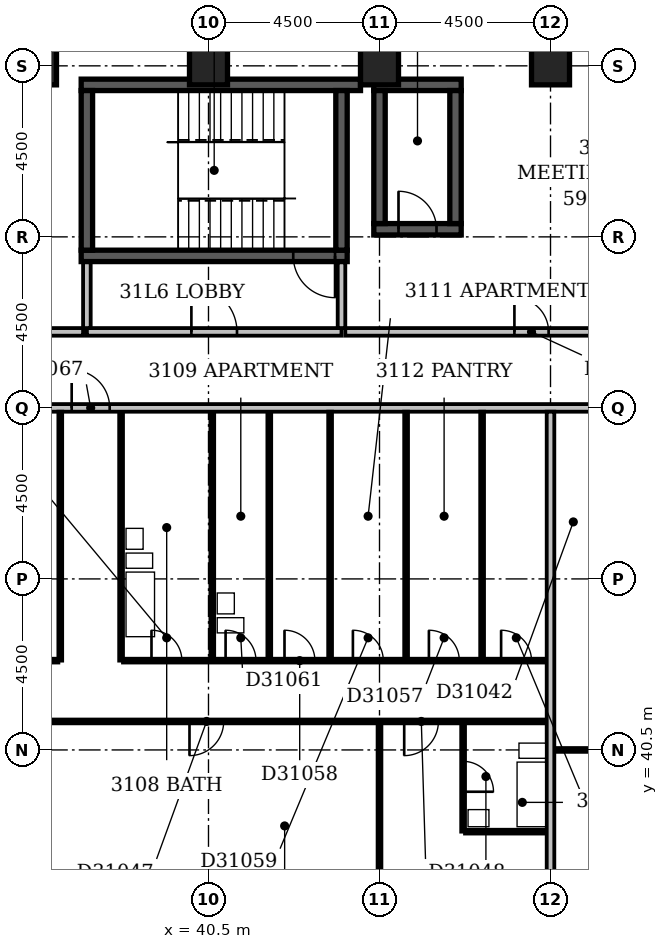
"""IFC4 building model, lengths in metres.
Left out: names, types, materials, properties, quantities, classifications, styles, units other than length and angle.
Written with IfcOpenShell. Run it as: python <this file> out.ifc"""

import sys

from ifc_helpers import new_model, si_unit, direction, frame, frame_2d, origin, origin_2d, place, context, subcontext, project, spatial, rectangle, extrude, element, fill, save


model = new_model("IFC4")
c1 = context("Model", 3, precision=1e-05, world=origin(), true_north=direction((0.0, 1.0)))
c2 = subcontext(c1, "Body", "Model", "MODEL_VIEW")
j1 = project(units=[si_unit("LENGTHUNIT", "METRE"), si_unit("PLANEANGLEUNIT", "RADIAN")], contexts=[c1])
p1 = place(None, origin())
s1 = spatial("IfcSite", under=j1, at=p1, CompositionType="ELEMENT")
p2 = place(p1, origin())
s2 = spatial("IfcBuilding", under=s1, at=p2, CompositionType="ELEMENT")
p3 = place(p2, frame((0.0, 0.0, 126.8)))
s3 = spatial("IfcBuildingStorey", under=s2, at=p3, CompositionType="ELEMENT", Elevation=126.8)
p4 = place(p3, frame((37.15, 53.5, -0.3), z_axis=(0.0, 0.0, 1.0), x_axis=(1.0, 0.0, 0.0)))
e1 = element("IfcWall", 1, at=p4, inside=s3, PredefinedType="SHEAR", context=c2, shape_type="SweptSolid", body=[
    extrude(rectangle(XDim=7.0, YDim=0.3, at=frame_2d((3.5, 0.0))), origin(), (0.0, 0.0, 1.0), 3.6),
])
p5 = place(p4, frame((5.58, 0.0, 0.3)))
e2 = element("IfcOpeningElement", 2, at=p5, cuts=e1, PredefinedType="OPENING", context=c2, shape_type="SweptSolid", body=[
    extrude(rectangle(XDim=1.1, YDim=2.1, at=frame_2d((0.55, 1.05))), frame((0.0, 0.162, 0.0), z_axis=(0.0, -1.0, 0.0), x_axis=(1.0, 0.0, 0.0)), (0.0, 0.0, 1.0), 0.324),
])
p6 = place(p3, frame((37.15, 58.0, -0.3), z_axis=(0.0, 0.0, 1.0), x_axis=(1.0, 0.0, 0.0)))
e3 = element("IfcWall", 3, at=p6, inside=s3, PredefinedType="SHEAR", context=c2, shape_type="SweptSolid", body=[
    extrude(rectangle(XDim=7.35, YDim=0.3, at=frame_2d((3.675, 0.0))), origin(), (0.0, 0.0, 1.0), 3.6),
])
for number, where, z_axis, x_axis in (
    (4, (37.3, 53.65, -0.3), (0.0, 0.0, 1.0), (0.0, 1.0, 0.0)),
    (5, (44.0, 53.65, -0.3), (0.0, 0.0, 1.0), (0.0, 1.0, 0.0)),
):
    element("IfcWall", number, at=place(p3, frame(where, z_axis=z_axis, x_axis=x_axis)), inside=s3, PredefinedType="SHEAR", context=c2, shape_type="SweptSolid", body=[
        extrude(rectangle(XDim=4.2, YDim=0.3, at=frame_2d((2.1, 0.0))), origin(), (0.0, 0.0, 1.0), 3.6),
    ])
p7 = place(p3, frame((44.85, 54.2, -0.3), z_axis=(0.0, 0.0, 1.0), x_axis=(1.0, 0.0, 0.0)))
e6 = element("IfcWall", 6, at=p7, inside=s3, PredefinedType="SHEAR", context=c2, shape_type="SweptSolid", body=[
    extrude(rectangle(XDim=2.3, YDim=0.3, at=frame_2d((1.15, 0.0))), origin(), (0.0, 0.0, 1.0), 3.6),
])
p8 = place(p7, frame((0.65, 0.0, 0.3)))
e7 = element("IfcOpeningElement", 7, at=p8, cuts=e6, PredefinedType="OPENING", context=c2, shape_type="SweptSolid", body=[
    extrude(rectangle(XDim=1.0, YDim=2.1, at=frame_2d((0.5, 1.05))), frame((0.0, 0.162, 0.0), z_axis=(0.0, -1.0, 0.0), x_axis=(1.0, 0.0, 0.0)), (0.0, 0.0, 1.0), 0.324),
])
p9 = place(p3, frame((44.85, 58.0, -0.3), z_axis=(0.0, 0.0, 1.0), x_axis=(1.0, 0.0, 0.0)))
e8 = element("IfcWall", 8, at=p9, inside=s3, PredefinedType="SHEAR", context=c2, shape_type="SweptSolid", body=[
    extrude(rectangle(XDim=2.3, YDim=0.3, at=frame_2d((1.15, 0.0))), origin(), (0.0, 0.0, 1.0), 3.6),
])
for number, where, z_axis, x_axis in (
    (9, (45.0, 54.35, -0.3), (0.0, 0.0, 1.0), (0.0, 1.0, 0.0)),
    (10, (47.0, 54.35, -0.3), (0.0, 0.0, 1.0), (0.0, 1.0, 0.0)),
):
    element("IfcWall", number, at=place(p3, frame(where, z_axis=z_axis, x_axis=x_axis)), inside=s3, PredefinedType="SHEAR", context=c2, shape_type="SweptSolid", body=[
        extrude(rectangle(XDim=3.5, YDim=0.3, at=frame_2d((1.75, 0.0))), origin(), (0.0, 0.0, 1.0), 3.6),
    ])
for number, where, z_axis, x_axis in (
    (11, (36.0, 58.5, -0.3), (0.0, 0.0, 1.0), (1.0, 0.0, 0.0)),
    (12, (40.5, 58.5, -0.3), (0.0, 0.0, 1.0), (1.0, 0.0, 0.0)),
    (13, (45.0, 58.5, -0.3), (0.0, 0.0, 1.0), (1.0, 0.0, 0.0)),
    (14, (49.5, 58.5, -0.3), (0.0, 0.0, 1.0), (1.0, 0.0, 0.0)),
):
    element("IfcColumn", number, at=place(p3, frame(where, z_axis=z_axis, x_axis=x_axis)), inside=s3, PredefinedType="COLUMN", context=c2, shape_type="SweptSolid", body=[
        extrude(rectangle(XDim=1.0, YDim=1.0, at=origin_2d()), origin(), (0.0, 0.0, 1.0), 3.6),
    ])
p10 = place(p3, frame((37.3, 51.5, 0.0), z_axis=(0.0, 0.0, 1.0), x_axis=(1.0, 0.0, 0.0)))
e15 = element("IfcWall", 15, at=p10, inside=s3, PredefinedType="PARTITIONING", context=c2, shape_type="SweptSolid", body=[
    extrude(rectangle(XDim=6.7, YDim=0.2, at=frame_2d((3.35, 0.0))), origin(), (0.0, 0.0, 1.0), 3.3),
])
p11 = place(p10, frame((2.75, 0.0, 0.0)))
e16 = element("IfcOpeningElement", 16, at=p11, cuts=e15, PredefinedType="OPENING", context=c2, shape_type="SweptSolid", body=[
    extrude(rectangle(XDim=1.2, YDim=2.1, at=frame_2d((0.6, 1.05))), frame((0.0, 0.112, 0.0), z_axis=(0.0, -1.0, 0.0), x_axis=(1.0, 0.0, 0.0)), (0.0, 0.0, 1.0), 0.224),
])
for number, where, z_axis, x_axis in (
    (17, (44.0, 51.6, 0.0), (0.0, 0.0, 1.0), (0.0, 1.0, 0.0)),
    (18, (37.3, 51.6, 0.0), (0.0, 0.0, 1.0), (0.0, 1.0, 0.0)),
):
    element("IfcWall", number, at=place(p3, frame(where, z_axis=z_axis, x_axis=x_axis)), inside=s3, PredefinedType="PARTITIONING", context=c2, shape_type="SweptSolid", body=[
        extrude(rectangle(XDim=1.73, YDim=0.2, at=frame_2d((0.865, 0.0))), origin(), (0.0, 0.0, 1.0), 3.3),
    ])
p12 = place(p3, frame((45.0, 36.5, 0.0), z_axis=(0.0, 0.0, 1.0), x_axis=(0.0, 1.0, 0.0)))
e19 = element("IfcWall", 19, at=p12, inside=s3, PredefinedType="PARTITIONING", context=c2, shape_type="SweptSolid", body=[
    extrude(rectangle(XDim=4.7, YDim=0.1, at=frame_2d((2.35, 0.0))), origin(), (0.0, 0.0, 1.0), 2.6),
])
p13 = place(p3, frame((49.5, 36.5, 0.0), z_axis=(0.0, 0.0, 1.0), x_axis=(0.0, 1.0, 0.0)))
e20 = element("IfcWall", 20, at=p13, inside=s3, PredefinedType="PARTITIONING", context=c2, shape_type="SweptSolid", body=[
    extrude(rectangle(XDim=12.9, YDim=0.2, at=frame_2d((6.45, 0.0))), origin(), (0.0, 0.0, 1.0), 3.3),
])
p14 = place(p3, frame((47.2, 38.35, 0.0), z_axis=(0.0, 0.0, 1.0), x_axis=(0.0, 1.0, 0.0)))
e21 = element("IfcWall", 21, at=p14, inside=s3, PredefinedType="PLUMBINGWALL", context=c2, shape_type="SweptSolid", body=[
    extrude(rectangle(XDim=2.85, YDim=0.1, at=frame_2d((1.425, 0.0))), origin(), (0.0, 0.0, 1.0), 3.3),
])
p15 = place(p14, frame((1.05, 0.0, 0.0)))
e22 = element("IfcOpeningElement", 22, at=p15, cuts=e21, PredefinedType="OPENING", context=c2, shape_type="SweptSolid", body=[
    extrude(rectangle(XDim=0.8, YDim=2.1, at=frame_2d((0.4, 1.05))), frame((0.0, 0.062, 0.0), z_axis=(0.0, -1.0, 0.0), x_axis=(1.0, 0.0, 0.0)), (0.0, 0.0, 1.0), 0.124),
])
p16 = place(p3, frame((47.25, 38.35, 0.0), z_axis=(0.0, 0.0, 1.0), x_axis=(1.0, 0.0, 0.0)))
e23 = element("IfcWall", 23, at=p16, inside=s3, PredefinedType="PLUMBINGWALL", context=c2, shape_type="SweptSolid", body=[
    extrude(rectangle(XDim=2.15, YDim=0.1, at=frame_2d((1.075, 0.0))), origin(), (0.0, 0.0, 1.0), 3.3),
])
p17 = place(p3, frame((49.6, 40.5, 0.0), z_axis=(0.0, 0.0, 1.0), x_axis=(1.0, 0.0, 0.0)))
e24 = element("IfcWall", 24, at=p17, inside=s3, PredefinedType="PARTITIONING", context=c2, shape_type="SweptSolid", body=[
    extrude(rectangle(XDim=4.3, YDim=0.1, at=frame_2d((2.15, 0.0))), origin(), (0.0, 0.0, 1.0), 3.3),
])
p18 = place(p17, frame((1.7, 0.0, 0.0)))
e25 = element("IfcOpeningElement", 25, at=p18, cuts=e24, PredefinedType="OPENING", context=c2, shape_type="SweptSolid", body=[
    extrude(rectangle(XDim=0.9, YDim=2.1, at=frame_2d((0.45, 1.05))), frame((0.0, 0.062, 0.0), z_axis=(0.0, -1.0, 0.0), x_axis=(1.0, 0.0, 0.0)), (0.0, 0.0, 1.0), 0.124),
])
p19 = place(p3, frame((31.6, 41.25, 0.0), z_axis=(0.0, 0.0, 1.0), x_axis=(1.0, 0.0, 0.0)))
e26 = element("IfcWall", 26, at=p19, inside=s3, PredefinedType="PARTITIONING", context=c2, shape_type="SweptSolid", body=[
    extrude(rectangle(XDim=17.8, YDim=0.1, at=frame_2d((8.9, 0.0))), origin(), (0.0, 0.0, 1.0), 3.3),
])
p20 = place(p19, frame((2.85, 0.0, 0.0)))
e27 = element("IfcOpeningElement", 27, at=p20, cuts=e26, PredefinedType="OPENING", context=c2, shape_type="SweptSolid", body=[
    extrude(rectangle(XDim=0.9, YDim=2.1, at=frame_2d((0.45, 1.05))), frame((0.0, 0.062, 0.0), z_axis=(0.0, -1.0, 0.0), x_axis=(1.0, 0.0, 0.0)), (0.0, 0.0, 1.0), 0.124),
])
p21 = place(p19, frame((8.4, 0.0, 0.0)))
e28 = element("IfcOpeningElement", 28, at=p21, cuts=e26, PredefinedType="OPENING", context=c2, shape_type="SweptSolid", body=[
    extrude(rectangle(XDim=0.9, YDim=2.1, at=frame_2d((0.45, 1.05))), frame((0.0, 0.062, 0.0), z_axis=(0.0, -1.0, 0.0), x_axis=(1.0, 0.0, 0.0)), (0.0, 0.0, 1.0), 0.124),
])
p22 = place(p19, frame((14.05, 0.0, 0.0)))
e29 = element("IfcOpeningElement", 29, at=p22, cuts=e26, PredefinedType="OPENING", context=c2, shape_type="SweptSolid", body=[
    extrude(rectangle(XDim=0.9, YDim=2.1, at=frame_2d((0.45, 1.05))), frame((0.0, 0.062, 0.0), z_axis=(0.0, -1.0, 0.0), x_axis=(1.0, 0.0, 0.0)), (0.0, 0.0, 1.0), 0.124),
])
p23 = place(p3, frame((31.6, 42.85, 0.0), z_axis=(0.0, 0.0, 1.0), x_axis=(1.0, 0.0, 0.0)))
e30 = element("IfcWall", 30, at=p23, inside=s3, PredefinedType="PARTITIONING", context=c2, shape_type="SweptSolid", body=[
    extrude(rectangle(XDim=4.95, YDim=0.1, at=frame_2d((2.475, 0.0))), origin(), (0.0, 0.0, 1.0), 3.3),
])
p24 = place(p23, frame((2.0, 0.0, 0.0)))
e31 = element("IfcOpeningElement", 31, at=p24, cuts=e30, PredefinedType="OPENING", context=c2, shape_type="SweptSolid", body=[
    extrude(rectangle(XDim=0.9, YDim=2.1, at=frame_2d((0.45, 1.05))), frame((0.0, 0.062, 0.0), z_axis=(0.0, -1.0, 0.0), x_axis=(1.0, 0.0, 0.0)), (0.0, 0.0, 1.0), 0.124),
])
p25 = place(p3, frame((36.6, 42.85, 0.0), z_axis=(0.0, 0.0, 1.0), x_axis=(0.0, 1.0, 0.0)))
e32 = element("IfcWall", 32, at=p25, inside=s3, PredefinedType="PARTITIONING", context=c2, shape_type="SweptSolid", body=[
    extrude(rectangle(XDim=6.55, YDim=0.1, at=frame_2d((3.275, 0.0))), origin(), (0.0, 0.0, 1.0), 2.4),
])
p26 = place(p3, frame((38.2, 42.85, 0.0), z_axis=(0.0, 0.0, 1.0), x_axis=(0.0, 1.0, 0.0)))
e33 = element("IfcWall", 33, at=p26, inside=s3, PredefinedType="PLUMBINGWALL", context=c2, shape_type="SweptSolid", body=[
    extrude(rectangle(XDim=6.55, YDim=0.1, at=frame_2d((3.275, 0.0))), origin(), (0.0, 0.0, 1.0), 3.3),
])
p27 = place(p3, frame((38.25, 42.85, 0.0), z_axis=(0.0, 0.0, 1.0), x_axis=(1.0, 0.0, 0.0)))
e34 = element("IfcWall", 34, at=p27, inside=s3, PredefinedType="PARTITIONING", context=c2, shape_type="SweptSolid", body=[
    extrude(rectangle(XDim=11.15, YDim=0.1, at=frame_2d((5.575, 0.0))), origin(), (0.0, 0.0, 1.0), 3.3),
])
p28 = place(p27, frame((0.75, 0.0, 0.0)))
e35 = element("IfcOpeningElement", 35, at=p28, cuts=e34, PredefinedType="OPENING", context=c2, shape_type="SweptSolid", body=[
    extrude(rectangle(XDim=0.8, YDim=2.1, at=frame_2d((0.4, 1.05))), frame((0.0, 0.062, 0.0), z_axis=(0.0, -1.0, 0.0), x_axis=(1.0, 0.0, 0.0)), (0.0, 0.0, 1.0), 0.124),
])
p29 = place(p27, frame((8.05, 0.0, 0.0)))
e36 = element("IfcOpeningElement", 36, at=p29, cuts=e34, PredefinedType="OPENING", context=c2, shape_type="SweptSolid", body=[
    extrude(rectangle(XDim=0.8, YDim=2.1, at=frame_2d((0.4, 1.05))), frame((0.0, 0.062, 0.0), z_axis=(0.0, -1.0, 0.0), x_axis=(1.0, 0.0, 0.0)), (0.0, 0.0, 1.0), 0.124),
])
p30 = place(p27, frame((4.25, 0.0, 0.0)))
e37 = element("IfcOpeningElement", 37, at=p30, cuts=e34, PredefinedType="OPENING", context=c2, shape_type="SweptSolid", body=[
    extrude(rectangle(XDim=0.8, YDim=2.1, at=frame_2d((0.4, 1.05))), frame((0.0, 0.062, 0.0), z_axis=(0.0, -1.0, 0.0), x_axis=(1.0, 0.0, 0.0)), (0.0, 0.0, 1.0), 0.124),
])
p31 = place(p27, frame((6.05, 0.0, 0.0)))
e38 = element("IfcOpeningElement", 38, at=p31, cuts=e34, PredefinedType="OPENING", context=c2, shape_type="SweptSolid", body=[
    extrude(rectangle(XDim=0.8, YDim=2.1, at=frame_2d((0.4, 1.05))), frame((0.0, 0.062, 0.0), z_axis=(0.0, -1.0, 0.0), x_axis=(1.0, 0.0, 0.0)), (0.0, 0.0, 1.0), 0.124),
])
p32 = place(p27, frame((9.95, 0.0, 0.0)))
e39 = element("IfcOpeningElement", 39, at=p32, cuts=e34, PredefinedType="OPENING", context=c2, shape_type="SweptSolid", body=[
    extrude(rectangle(XDim=0.8, YDim=2.1, at=frame_2d((0.4, 1.05))), frame((0.0, 0.062, 0.0), z_axis=(0.0, -1.0, 0.0), x_axis=(1.0, 0.0, 0.0)), (0.0, 0.0, 1.0), 0.124),
])
p33 = place(p27, frame((2.7, 0.0, 0.0)))
e40 = element("IfcOpeningElement", 40, at=p33, cuts=e34, PredefinedType="OPENING", context=c2, shape_type="SweptSolid", body=[
    extrude(rectangle(XDim=0.8, YDim=2.1, at=frame_2d((0.4, 1.05))), frame((0.0, 0.062, 0.0), z_axis=(0.0, -1.0, 0.0), x_axis=(1.0, 0.0, 0.0)), (0.0, 0.0, 1.0), 0.124),
])
for number, where, z_axis, x_axis in (
    (41, (40.6, 42.9, 0.0), (0.0, 0.0, 1.0), (0.0, 1.0, 0.0)),
    (42, (42.1, 42.9, 0.0), (0.0, 0.0, 1.0), (0.0, 1.0, 0.0)),
):
    element("IfcWall", number, at=place(p3, frame(where, z_axis=z_axis, x_axis=x_axis)), inside=s3, PredefinedType="PLUMBINGWALL", context=c2, shape_type="SweptSolid", body=[
        extrude(rectangle(XDim=6.5, YDim=0.1, at=frame_2d((3.25, 0.0))), origin(), (0.0, 0.0, 1.0), 3.3),
    ])
p34 = place(p3, frame((43.7, 42.9, 0.0), z_axis=(0.0, 0.0, 1.0), x_axis=(0.0, 1.0, 0.0)))
e43 = element("IfcWall", 43, at=p34, inside=s3, PredefinedType="PARTITIONING", context=c2, shape_type="SweptSolid", body=[
    extrude(rectangle(XDim=6.5, YDim=0.1, at=frame_2d((3.25, 0.0))), origin(), (0.0, 0.0, 1.0), 3.3),
])
p35 = place(p3, frame((45.7, 42.9, 0.0), z_axis=(0.0, 0.0, 1.0), x_axis=(0.0, 1.0, 0.0)))
e44 = element("IfcWall", 44, at=p35, inside=s3, PredefinedType="PARTITIONING", context=c2, shape_type="SweptSolid", body=[
    extrude(rectangle(XDim=6.5, YDim=0.1, at=frame_2d((3.25, 0.0))), origin(), (0.0, 0.0, 1.0), 2.6),
])
p36 = place(p3, frame((47.7, 42.9, 0.0), z_axis=(0.0, 0.0, 1.0), x_axis=(0.0, 1.0, 0.0)))
e45 = element("IfcWall", 45, at=p36, inside=s3, PredefinedType="PARTITIONING", context=c2, shape_type="SweptSolid", body=[
    extrude(rectangle(XDim=6.5, YDim=0.1, at=frame_2d((3.25, 0.0))), origin(), (0.0, 0.0, 1.0), 3.3),
])
p37 = place(p3, frame((9.1, 49.5, 0.0), z_axis=(0.0, 0.0, 1.0), x_axis=(1.0, 0.0, 0.0)))
e46 = element("IfcWall", 46, at=p37, inside=s3, PredefinedType="PARTITIONING", context=c2, shape_type="SweptSolid", body=[
    extrude(rectangle(XDim=41.55, YDim=0.2, at=frame_2d((20.775, 0.0))), origin(), (0.0, 0.0, 1.0), 3.3),
])
p38 = place(p37, frame((13.7, 0.0, 0.0)))
e47 = element("IfcOpeningElement", 47, at=p38, cuts=e46, PredefinedType="OPENING", context=c2, shape_type="SweptSolid", body=[
    extrude(rectangle(XDim=1.0, YDim=2.1, at=frame_2d((0.5, 1.05))), frame((0.0, 0.112, 0.0), z_axis=(0.0, -1.0, 0.0), x_axis=(1.0, 0.0, 0.0)), (0.0, 0.0, 1.0), 0.224),
])
p39 = place(p37, frame((27.8, 0.0, 0.0)))
e48 = element("IfcOpeningElement", 48, at=p39, cuts=e46, PredefinedType="OPENING", context=c2, shape_type="SweptSolid", body=[
    extrude(rectangle(XDim=1.0, YDim=2.1, at=frame_2d((0.5, 1.05))), frame((0.0, 0.112, 0.0), z_axis=(0.0, -1.0, 0.0), x_axis=(1.0, 0.0, 0.0)), (0.0, 0.0, 1.0), 0.224),
])
p40 = place(p37, frame((8.4, 0.0, 0.0)))
e49 = element("IfcOpeningElement", 49, at=p40, cuts=e46, PredefinedType="OPENING", context=c2, shape_type="SweptSolid", body=[
    extrude(rectangle(XDim=0.9, YDim=2.1, at=frame_2d((0.45, 1.05))), frame((0.0, 0.112, 0.0), z_axis=(0.0, -1.0, 0.0), x_axis=(1.0, 0.0, 0.0)), (0.0, 0.0, 1.0), 0.224),
])
p41 = place(p3, frame((27.9, 51.5, 0.0), z_axis=(0.0, 0.0, 1.0), x_axis=(1.0, 0.0, 0.0)))
e50 = element("IfcWall", 50, at=p41, inside=s3, PredefinedType="PARTITIONING", context=c2, shape_type="SweptSolid", body=[
    extrude(rectangle(XDim=9.3, YDim=0.2, at=frame_2d((4.65, 0.0))), origin(), (0.0, 0.0, 1.0), 3.3),
])
p42 = place(p41, frame((4.2, 0.0, 0.0)))
e51 = element("IfcOpeningElement", 51, at=p42, cuts=e50, PredefinedType="OPENING", context=c2, shape_type="SweptSolid", body=[
    extrude(rectangle(XDim=0.9, YDim=2.1, at=frame_2d((0.45, 1.05))), frame((0.0, 0.112, 0.0), z_axis=(0.0, -1.0, 0.0), x_axis=(1.0, 0.0, 0.0)), (0.0, 0.0, 1.0), 0.224),
])
p43 = place(p3, frame((44.1, 51.5, 0.0), z_axis=(0.0, 0.0, 1.0), x_axis=(1.0, 0.0, 0.0)))
e52 = element("IfcWall", 52, at=p43, inside=s3, PredefinedType="PARTITIONING", context=c2, shape_type="SweptSolid", body=[
    extrude(rectangle(XDim=9.8, YDim=0.2, at=frame_2d((4.9, 0.0))), origin(), (0.0, 0.0, 1.0), 3.3),
])
p44 = place(p43, frame((4.45, 0.0, 0.0)))
e53 = element("IfcOpeningElement", 53, at=p44, cuts=e52, PredefinedType="OPENING", context=c2, shape_type="SweptSolid", body=[
    extrude(rectangle(XDim=0.9, YDim=2.1, at=frame_2d((0.45, 1.05))), frame((0.0, 0.112, 0.0), z_axis=(0.0, -1.0, 0.0), x_axis=(1.0, 0.0, 0.0)), (0.0, 0.0, 1.0), 0.224),
])
p45 = place(p11, origin())
e54 = element("IfcDoor", 54, at=p45, inside=s3, OperationType="SINGLE_SWING_LEFT", PredefinedType="DOOR", context=c2, shape_type="SweptSolid", body=[
    extrude(rectangle(XDim=1.2, YDim=2.1, at=frame_2d((0.6, 1.05))), frame((0.0, 0.025, 0.0), z_axis=(0.0, -1.0, 0.0), x_axis=(1.0, 0.0, 0.0)), (0.0, 0.0, 1.0), 0.05),
])
fill(e16, e54)
p46 = place(p8, origin())
e55 = element("IfcDoor", 55, at=p46, inside=s3, OperationType="SINGLE_SWING_LEFT", PredefinedType="DOOR", context=c2, shape_type="SweptSolid", body=[
    extrude(rectangle(XDim=1.0, YDim=2.1, at=frame_2d((0.5, 1.05))), frame((0.0, 0.025, 0.0), z_axis=(0.0, -1.0, 0.0), x_axis=(1.0, 0.0, 0.0)), (0.0, 0.0, 1.0), 0.05),
])
fill(e7, e55)
p47 = place(p5, origin())
e56 = element("IfcDoor", 56, at=p47, inside=s3, OperationType="SINGLE_SWING_RIGHT", PredefinedType="DOOR", context=c2, shape_type="SweptSolid", body=[
    extrude(rectangle(XDim=1.1, YDim=2.1, at=frame_2d((0.55, 1.05))), frame((0.0, 0.025, 0.0), z_axis=(0.0, -1.0, 0.0), x_axis=(1.0, 0.0, 0.0)), (0.0, 0.0, 1.0), 0.05),
])
fill(e2, e56)
p48 = place(p15, frame((0.8, 0.0, 0.0), z_axis=(0.0, 0.0, 1.0), x_axis=(-1.0, 0.0, 0.0)))
e57 = element("IfcDoor", 57, at=p48, inside=s3, OperationType="SINGLE_SWING_RIGHT", PredefinedType="DOOR", context=c2, shape_type="SweptSolid", body=[
    extrude(rectangle(XDim=0.8, YDim=2.1, at=frame_2d((0.4, 1.05))), frame((0.0, 0.025, 0.0), z_axis=(0.0, -1.0, 0.0), x_axis=(1.0, 0.0, 0.0)), (0.0, 0.0, 1.0), 0.05),
])
fill(e22, e57)
p49 = place(p21, frame((0.9, 0.0, 0.0), z_axis=(0.0, 0.0, 1.0), x_axis=(-1.0, 0.0, 0.0)))
e58 = element("IfcDoor", 58, at=p49, inside=s3, OperationType="SINGLE_SWING_RIGHT", PredefinedType="DOOR", context=c2, shape_type="SweptSolid", body=[
    extrude(rectangle(XDim=0.9, YDim=2.1, at=frame_2d((0.45, 1.05))), frame((0.0, 0.025, 0.0), z_axis=(0.0, -1.0, 0.0), x_axis=(1.0, 0.0, 0.0)), (0.0, 0.0, 1.0), 0.05),
])
fill(e28, e58)
p50 = place(p22, frame((0.9, 0.0, 0.0), z_axis=(0.0, 0.0, 1.0), x_axis=(-1.0, 0.0, 0.0)))
e59 = element("IfcDoor", 59, at=p50, inside=s3, OperationType="SINGLE_SWING_RIGHT", PredefinedType="DOOR", context=c2, shape_type="SweptSolid", body=[
    extrude(rectangle(XDim=0.9, YDim=2.1, at=frame_2d((0.45, 1.05))), frame((0.0, 0.025, 0.0), z_axis=(0.0, -1.0, 0.0), x_axis=(1.0, 0.0, 0.0)), (0.0, 0.0, 1.0), 0.05),
])
fill(e29, e59)
p51 = place(p28, origin())
e60 = element("IfcDoor", 60, at=p51, inside=s3, OperationType="SINGLE_SWING_LEFT", PredefinedType="DOOR", context=c2, shape_type="SweptSolid", body=[
    extrude(rectangle(XDim=0.8, YDim=2.1, at=frame_2d((0.4, 1.05))), frame((0.0, 0.025, 0.0), z_axis=(0.0, -1.0, 0.0), x_axis=(1.0, 0.0, 0.0)), (0.0, 0.0, 1.0), 0.05),
])
fill(e35, e60)
p52 = place(p29, origin())
e61 = element("IfcDoor", 61, at=p52, inside=s3, OperationType="SINGLE_SWING_LEFT", PredefinedType="DOOR", context=c2, shape_type="SweptSolid", body=[
    extrude(rectangle(XDim=0.8, YDim=2.1, at=frame_2d((0.4, 1.05))), frame((0.0, 0.025, 0.0), z_axis=(0.0, -1.0, 0.0), x_axis=(1.0, 0.0, 0.0)), (0.0, 0.0, 1.0), 0.05),
])
fill(e36, e61)
p53 = place(p30, origin())
e62 = element("IfcDoor", 62, at=p53, inside=s3, OperationType="SINGLE_SWING_LEFT", PredefinedType="DOOR", context=c2, shape_type="SweptSolid", body=[
    extrude(rectangle(XDim=0.8, YDim=2.1, at=frame_2d((0.4, 1.05))), frame((0.0, 0.025, 0.0), z_axis=(0.0, -1.0, 0.0), x_axis=(1.0, 0.0, 0.0)), (0.0, 0.0, 1.0), 0.05),
])
fill(e37, e62)
p54 = place(p31, origin())
e63 = element("IfcDoor", 63, at=p54, inside=s3, OperationType="SINGLE_SWING_LEFT", PredefinedType="DOOR", context=c2, shape_type="SweptSolid", body=[
    extrude(rectangle(XDim=0.8, YDim=2.1, at=frame_2d((0.4, 1.05))), frame((0.0, 0.025, 0.0), z_axis=(0.0, -1.0, 0.0), x_axis=(1.0, 0.0, 0.0)), (0.0, 0.0, 1.0), 0.05),
])
fill(e38, e63)
p55 = place(p32, origin())
e64 = element("IfcDoor", 64, at=p55, inside=s3, OperationType="SINGLE_SWING_LEFT", PredefinedType="DOOR", context=c2, shape_type="SweptSolid", body=[
    extrude(rectangle(XDim=0.8, YDim=2.1, at=frame_2d((0.4, 1.05))), frame((0.0, 0.025, 0.0), z_axis=(0.0, -1.0, 0.0), x_axis=(1.0, 0.0, 0.0)), (0.0, 0.0, 1.0), 0.05),
])
fill(e39, e64)
p56 = place(p33, origin())
e65 = element("IfcDoor", 65, at=p56, inside=s3, OperationType="SINGLE_SWING_LEFT", PredefinedType="DOOR", context=c2, shape_type="SweptSolid", body=[
    extrude(rectangle(XDim=0.8, YDim=2.1, at=frame_2d((0.4, 1.05))), frame((0.0, 0.025, 0.0), z_axis=(0.0, -1.0, 0.0), x_axis=(1.0, 0.0, 0.0)), (0.0, 0.0, 1.0), 0.05),
])
fill(e40, e65)
p57 = place(p39, origin())
e66 = element("IfcDoor", 66, at=p57, inside=s3, OperationType="SINGLE_SWING_LEFT", PredefinedType="DOOR", context=c2, shape_type="SweptSolid", body=[
    extrude(rectangle(XDim=1.0, YDim=2.1, at=frame_2d((0.5, 1.05))), frame((0.0, 0.025, 0.0), z_axis=(0.0, -1.0, 0.0), x_axis=(1.0, 0.0, 0.0)), (0.0, 0.0, 1.0), 0.05),
])
fill(e48, e66)
p58 = place(p44, origin())
e67 = element("IfcDoor", 67, at=p58, inside=s3, OperationType="SINGLE_SWING_LEFT", PredefinedType="DOOR", context=c2, shape_type="SweptSolid", body=[
    extrude(rectangle(XDim=0.9, YDim=2.1, at=frame_2d((0.45, 1.05))), frame((0.0, 0.025, 0.0), z_axis=(0.0, -1.0, 0.0), x_axis=(1.0, 0.0, 0.0)), (0.0, 0.0, 1.0), 0.05),
])
fill(e53, e67)
save(model, sys.argv[1])
